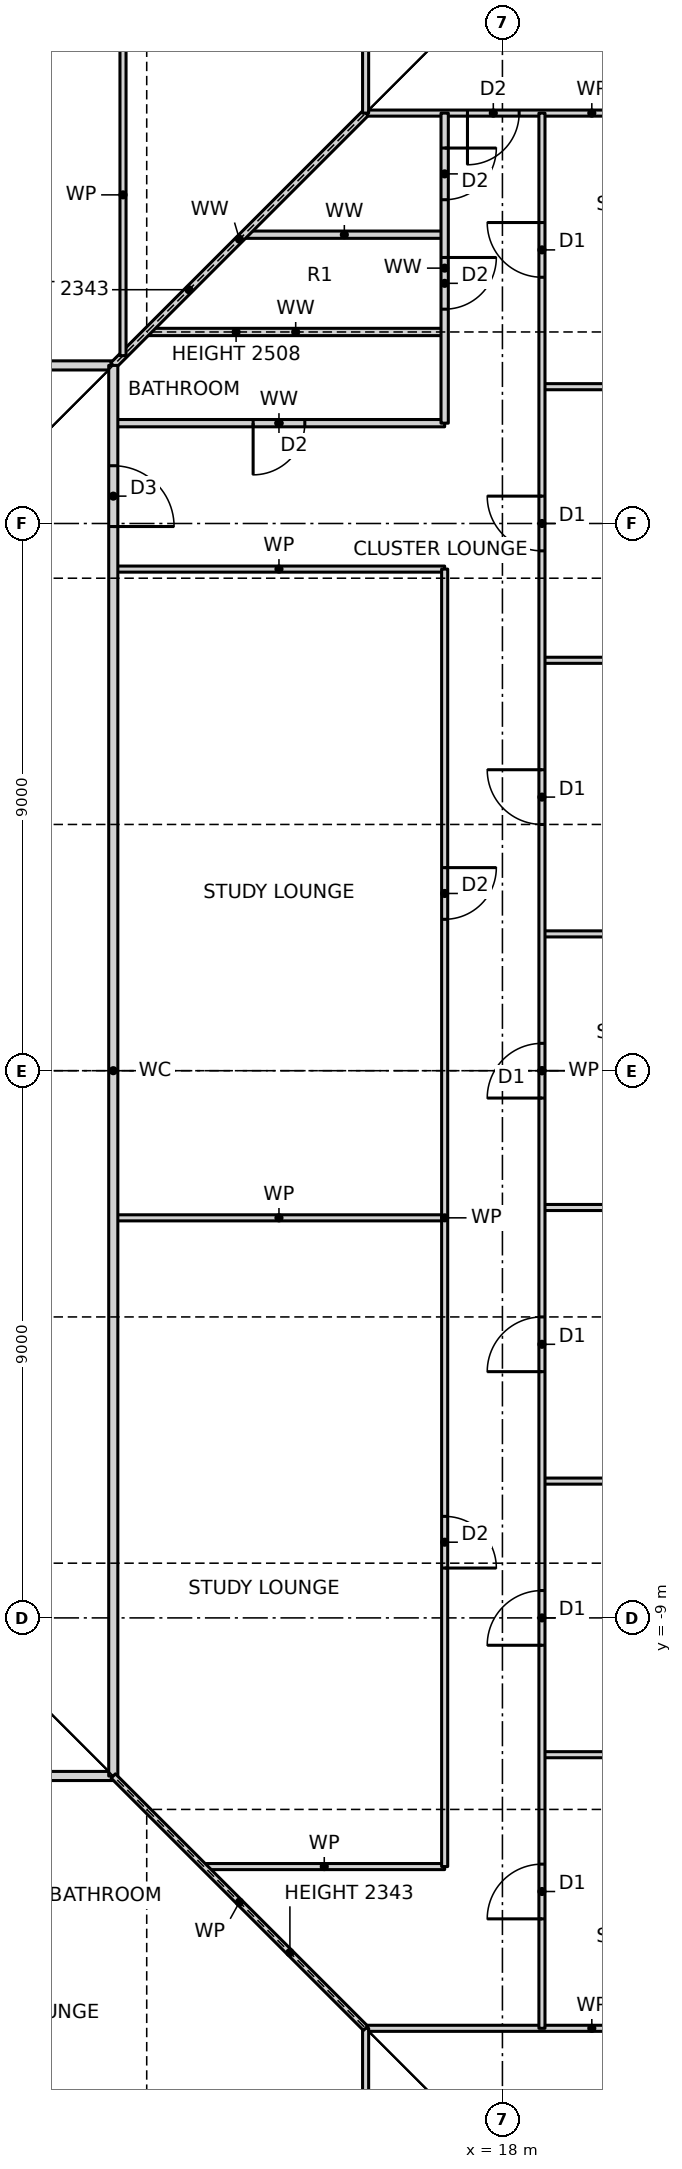
"""IFC4 building model, lengths in metres.
Left out: names, types, materials, properties, quantities, classifications, styles, units other than length and angle.
Written with IfcOpenShell. Run it as: python <this file> out.ifc"""

import sys

from ifc_helpers import new_model, si_unit, direction, frame, frame_2d, origin, place, context, subcontext, project, spatial, rectangle, extrude, element, fill, save


model = new_model("IFC4")
c1 = context("Model", 3, precision=1e-05, world=origin(), true_north=direction((0.0, 1.0)))
c2 = subcontext(c1, "Body", "Model", "MODEL_VIEW")
j1 = project(units=[si_unit("LENGTHUNIT", "METRE"), si_unit("PLANEANGLEUNIT", "RADIAN")], contexts=[c1])
p1 = place(None, origin())
s1 = spatial("IfcSite", under=j1, at=p1, CompositionType="ELEMENT")
p2 = place(p1, origin())
s2 = spatial("IfcBuilding", under=s1, at=p2, CompositionType="ELEMENT")
p3 = place(p2, frame((0.0, 0.0, 46.5)))
s3 = spatial("IfcBuildingStorey", under=s2, at=p3, CompositionType="ELEMENT", Elevation=46.5)
p4 = place(p3, frame((15.75, -15.75, 0.0), z_axis=(0.0, 0.0, 1.0), x_axis=(1.0, 0.0, 0.0)))
e1 = element("IfcWall", 1, at=p4, inside=s3, PredefinedType="PARTITIONING", context=c2, shape_type="SweptSolid", body=[
    extrude(rectangle(XDim=7.44, YDim=0.1, at=frame_2d((3.72, 0.0))), origin(), (0.0, 0.0, 1.0), 3.27),
])
p5 = place(p3, frame((13.09, -13.09, 0.0), z_axis=(0.0, 0.0, 1.0), x_axis=(1.0, 0.0, 0.0)))
e2 = element("IfcWall", 2, at=p5, inside=s3, PredefinedType="PARTITIONING", context=c2, shape_type="SweptSolid", body=[
    extrude(rectangle(XDim=3.96, YDim=0.1, at=frame_2d((1.98, 0.0))), origin(), (0.0, 0.0, 1.0), 3.27),
])
p6 = place(p3, frame((-12.6, -11.6, 0.0), z_axis=(0.0, 0.0, 1.0), x_axis=(1.0, 0.0, 0.0)))
e3 = element("IfcWall", 3, at=p6, inside=s3, PredefinedType="PARTITIONING", context=c2, shape_type="SweptSolid", body=[
    extrude(rectangle(XDim=24.2, YDim=0.15, at=frame_2d((12.1, 0.0))), origin(), (0.0, 0.0, 1.0), 3.27),
])
p7 = place(p6, frame((2.64, 0.0, 0.0)))
e4 = element("IfcOpeningElement", 4, at=p7, cuts=e3, PredefinedType="OPENING", context=c2, shape_type="SweptSolid", body=[
    extrude(rectangle(XDim=1.0, YDim=2.1, at=frame_2d((0.5, 1.05))), frame((0.0, 0.085, 0.0), z_axis=(0.0, -1.0, 0.0), x_axis=(1.0, 0.0, 0.0)), (0.0, 0.0, 1.0), 0.17),
])
p8 = place(p6, frame((13.5, 0.0, 0.0)))
e5 = element("IfcOpeningElement", 5, at=p8, cuts=e3, PredefinedType="OPENING", context=c2, shape_type="SweptSolid", body=[
    extrude(rectangle(XDim=0.9, YDim=2.1, at=frame_2d((0.45, 1.05))), frame((0.0, 0.085, 0.0), z_axis=(0.0, -1.0, 0.0), x_axis=(1.0, 0.0, 0.0)), (0.0, 0.0, 1.0), 0.17),
])
p9 = place(p6, frame((22.025, 0.0, 0.0)))
e6 = element("IfcOpeningElement", 6, at=p9, cuts=e3, PredefinedType="OPENING", context=c2, shape_type="SweptSolid", body=[
    extrude(rectangle(XDim=1.0, YDim=2.1, at=frame_2d((0.5, 1.05))), frame((0.0, 0.085, 0.0), z_axis=(0.0, -1.0, 0.0), x_axis=(1.0, 0.0, 0.0)), (0.0, 0.0, 1.0), 0.17),
])
for number, where, z_axis, x_axis in (
    (7, (18.65, -11.25, 0.0), (0.0, 0.0, 1.0), (1.0, 0.0, 0.0)),
    (8, (18.65, -6.75, 0.0), (0.0, 0.0, 1.0), (1.0, 0.0, 0.0)),
):
    element("IfcWall", number, at=place(p3, frame(where, z_axis=z_axis, x_axis=x_axis)), inside=s3, PredefinedType="PARTITIONING", context=c2, shape_type="SweptSolid", body=[
        extrude(rectangle(XDim=4.54, YDim=0.1, at=frame_2d((2.27, 0.0))), origin(), (0.0, 0.0, 1.0), 3.27),
    ])
p10 = place(p3, frame((11.6, -2.42, 0.0), z_axis=(0.0, 0.0, 1.0), x_axis=(1.0, 0.0, 0.0)))
e9 = element("IfcWall", 9, at=p10, inside=s3, PredefinedType="PARTITIONING", context=c2, shape_type="SweptSolid", body=[
    extrude(rectangle(XDim=5.45, YDim=0.1, at=frame_2d((2.725, 0.0))), origin(), (0.0, 0.0, 1.0), 3.27),
])
for number, where, z_axis, x_axis in (
    (10, (18.65, -2.25, 0.0), (0.0, 0.0, 1.0), (1.0, 0.0, 0.0)),
    (11, (18.65, 2.25, 0.0), (0.0, 0.0, 1.0), (1.0, 0.0, 0.0)),
    (12, (18.65, 6.75, 0.0), (0.0, 0.0, 1.0), (1.0, 0.0, 0.0)),
):
    element("IfcWall", number, at=place(p3, frame(where, z_axis=z_axis, x_axis=x_axis)), inside=s3, PredefinedType="PARTITIONING", context=c2, shape_type="SweptSolid", body=[
        extrude(rectangle(XDim=4.54, YDim=0.1, at=frame_2d((2.27, 0.0))), origin(), (0.0, 0.0, 1.0), 3.27),
    ])
p11 = place(p3, frame((11.6, 8.25, 0.0), z_axis=(0.0, 0.0, 1.0), x_axis=(1.0, 0.0, 0.0)))
e13 = element("IfcWall", 13, at=p11, inside=s3, PredefinedType="PARTITIONING", context=c2, shape_type="SweptSolid", body=[
    extrude(rectangle(XDim=5.45, YDim=0.1, at=frame_2d((2.725, 0.0))), origin(), (0.0, 0.0, 1.0), 3.27),
])
p12 = place(p3, frame((11.6, 10.65, 0.0), z_axis=(0.0, 0.0, 1.0), x_axis=(1.0, 0.0, 0.0)))
e14 = element("IfcWall", 14, at=p12, inside=s3, PredefinedType="PARTITIONING", context=c2, shape_type="SweptSolid", body=[
    extrude(rectangle(XDim=5.45, YDim=0.12, at=frame_2d((2.725, 0.0))), origin(), (0.0, 0.0, 1.0), 3.27),
])
p13 = place(p12, frame((2.3, 0.0, 0.0)))
e15 = element("IfcOpeningElement", 15, at=p13, cuts=e14, PredefinedType="OPENING", context=c2, shape_type="SweptSolid", body=[
    extrude(rectangle(XDim=0.85, YDim=2.1, at=frame_2d((0.425, 1.05))), frame((0.0, 0.07, 0.0), z_axis=(0.0, -1.0, 0.0), x_axis=(1.0, 0.0, 0.0)), (0.0, 0.0, 1.0), 0.14),
])
p14 = place(p3, frame((18.65, 11.25, 0.0), z_axis=(0.0, 0.0, 1.0), x_axis=(1.0, 0.0, 0.0)))
e16 = element("IfcWall", 16, at=p14, inside=s3, PredefinedType="PARTITIONING", context=c2, shape_type="SweptSolid", body=[
    extrude(rectangle(XDim=4.54, YDim=0.1, at=frame_2d((2.27, 0.0))), origin(), (0.0, 0.0, 1.0), 3.27),
])
p15 = place(p3, frame((-12.6, 11.6, 0.0), z_axis=(0.0, 0.0, 1.0), x_axis=(1.0, 0.0, 0.0)))
e17 = element("IfcWall", 17, at=p15, inside=s3, PredefinedType="PARTITIONING", context=c2, shape_type="SweptSolid", body=[
    extrude(rectangle(XDim=24.2, YDim=0.15, at=frame_2d((12.1, 0.0))), origin(), (0.0, 0.0, 1.0), 3.27),
])
p16 = place(p15, frame((7.15, 0.0, 0.0)))
e18 = element("IfcOpeningElement", 18, at=p16, cuts=e17, PredefinedType="OPENING", context=c2, shape_type="SweptSolid", body=[
    extrude(rectangle(XDim=1.0, YDim=2.1, at=frame_2d((0.5, 1.05))), frame((0.0, 0.085, 0.0), z_axis=(0.0, -1.0, 0.0), x_axis=(1.0, 0.0, 0.0)), (0.0, 0.0, 1.0), 0.17),
])
p17 = place(p3, frame((12.15, 12.15, 0.0), z_axis=(0.0, 0.0, 1.0), x_axis=(1.0, 0.0, 0.0)))
e19 = element("IfcWall", 19, at=p17, inside=s3, PredefinedType="PARTITIONING", context=c2, shape_type="SweptSolid", body=[
    extrude(rectangle(XDim=4.9, YDim=0.12, at=frame_2d((2.45, 0.0))), origin(), (0.0, 0.0, 1.0), 2.508),
])
p18 = place(p3, frame((13.75, 13.75, 0.0), z_axis=(0.0, 0.0, 1.0), x_axis=(1.0, 0.0, 0.0)))
e20 = element("IfcWall", 20, at=p18, inside=s3, PredefinedType="PARTITIONING", context=c2, shape_type="SweptSolid", body=[
    extrude(rectangle(XDim=3.3, YDim=0.12, at=frame_2d((1.65, 0.0))), origin(), (0.0, 0.0, 1.0), 3.27),
])
p19 = place(p3, frame((15.75, 15.75, 0.0), z_axis=(0.0, 0.0, 1.0), x_axis=(1.0, 0.0, 0.0)))
e21 = element("IfcWall", 21, at=p19, inside=s3, PredefinedType="PARTITIONING", context=c2, shape_type="SweptSolid", body=[
    extrude(rectangle(XDim=7.44, YDim=0.1, at=frame_2d((3.72, 0.0))), origin(), (0.0, 0.0, 1.0), 3.27),
])
p20 = place(p19, frame((1.675, 0.0, 0.0)))
e22 = element("IfcOpeningElement", 22, at=p20, cuts=e21, PredefinedType="OPENING", context=c2, shape_type="SweptSolid", body=[
    extrude(rectangle(XDim=0.85, YDim=2.1, at=frame_2d((0.425, 1.05))), frame((0.0, 0.06, 0.0), z_axis=(0.0, -1.0, 0.0), x_axis=(1.0, 0.0, 0.0)), (0.0, 0.0, 1.0), 0.12),
])
p21 = place(p3, frame((11.6, 11.6, 0.0), z_axis=(0.0, 0.0, 1.0), x_axis=(0.707106781187, 0.707106781187, 0.0)))
e23 = element("IfcWall", 23, at=p21, inside=s3, PredefinedType="PARTITIONING", context=c2, shape_type="SweptSolid", body=[
    extrude(rectangle(XDim=5.869, YDim=0.12, at=frame_2d((2.935, 0.0))), origin(), (0.0, 0.0, 1.0), 2.343),
])
p22 = place(p3, frame((18.65, -15.75, 0.0), z_axis=(0.0, 0.0, 1.0), x_axis=(0.0, 1.0, 0.0)))
e24 = element("IfcWall", 24, at=p22, inside=s3, PredefinedType="PARTITIONING", context=c2, shape_type="SweptSolid", body=[
    extrude(rectangle(XDim=31.5, YDim=0.1, at=frame_2d((15.75, 0.0))), origin(), (0.0, 0.0, 1.0), 3.27),
])
p23 = place(p22, frame((1.8, 0.0, 0.0)))
e25 = element("IfcOpeningElement", 25, at=p23, cuts=e24, PredefinedType="OPENING", context=c2, shape_type="SweptSolid", body=[
    extrude(rectangle(XDim=0.9, YDim=2.1, at=frame_2d((0.45, 1.05))), frame((0.0, 0.06, 0.0), z_axis=(0.0, -1.0, 0.0), x_axis=(1.0, 0.0, 0.0)), (0.0, 0.0, 1.0), 0.12),
])
p24 = place(p22, frame((6.3, 0.0, 0.0)))
e26 = element("IfcOpeningElement", 26, at=p24, cuts=e24, PredefinedType="OPENING", context=c2, shape_type="SweptSolid", body=[
    extrude(rectangle(XDim=0.9, YDim=2.1, at=frame_2d((0.45, 1.05))), frame((0.0, 0.06, 0.0), z_axis=(0.0, -1.0, 0.0), x_axis=(1.0, 0.0, 0.0)), (0.0, 0.0, 1.0), 0.12),
])
p25 = place(p22, frame((10.8, 0.0, 0.0)))
e27 = element("IfcOpeningElement", 27, at=p25, cuts=e24, PredefinedType="OPENING", context=c2, shape_type="SweptSolid", body=[
    extrude(rectangle(XDim=0.9, YDim=2.1, at=frame_2d((0.45, 1.05))), frame((0.0, 0.06, 0.0), z_axis=(0.0, -1.0, 0.0), x_axis=(1.0, 0.0, 0.0)), (0.0, 0.0, 1.0), 0.12),
])
p26 = place(p22, frame((15.3, 0.0, 0.0)))
e28 = element("IfcOpeningElement", 28, at=p26, cuts=e24, PredefinedType="OPENING", context=c2, shape_type="SweptSolid", body=[
    extrude(rectangle(XDim=0.9, YDim=2.1, at=frame_2d((0.45, 1.05))), frame((0.0, 0.06, 0.0), z_axis=(0.0, -1.0, 0.0), x_axis=(1.0, 0.0, 0.0)), (0.0, 0.0, 1.0), 0.12),
])
p27 = place(p22, frame((19.8, 0.0, 0.0)))
e29 = element("IfcOpeningElement", 29, at=p27, cuts=e24, PredefinedType="OPENING", context=c2, shape_type="SweptSolid", body=[
    extrude(rectangle(XDim=0.9, YDim=2.1, at=frame_2d((0.45, 1.05))), frame((0.0, 0.06, 0.0), z_axis=(0.0, -1.0, 0.0), x_axis=(1.0, 0.0, 0.0)), (0.0, 0.0, 1.0), 0.12),
])
p28 = place(p22, frame((24.3, 0.0, 0.0)))
e30 = element("IfcOpeningElement", 30, at=p28, cuts=e24, PredefinedType="OPENING", context=c2, shape_type="SweptSolid", body=[
    extrude(rectangle(XDim=0.9, YDim=2.1, at=frame_2d((0.45, 1.05))), frame((0.0, 0.06, 0.0), z_axis=(0.0, -1.0, 0.0), x_axis=(1.0, 0.0, 0.0)), (0.0, 0.0, 1.0), 0.12),
])
p29 = place(p22, frame((28.8, 0.0, 0.0)))
e31 = element("IfcOpeningElement", 31, at=p29, cuts=e24, PredefinedType="OPENING", context=c2, shape_type="SweptSolid", body=[
    extrude(rectangle(XDim=0.9, YDim=2.1, at=frame_2d((0.45, 1.05))), frame((0.0, 0.06, 0.0), z_axis=(0.0, -1.0, 0.0), x_axis=(1.0, 0.0, 0.0)), (0.0, 0.0, 1.0), 0.12),
])
p30 = place(p3, frame((17.05, -13.09, 0.0), z_axis=(0.0, 0.0, 1.0), x_axis=(0.0, 1.0, 0.0)))
e32 = element("IfcWall", 32, at=p30, inside=s3, PredefinedType="PARTITIONING", context=c2, shape_type="SweptSolid", body=[
    extrude(rectangle(XDim=21.34, YDim=0.1, at=frame_2d((10.67, 0.0))), origin(), (0.0, 0.0, 1.0), 3.27),
])
p31 = place(p30, frame((4.91, 0.0, 0.0)))
e33 = element("IfcOpeningElement", 33, at=p31, cuts=e32, PredefinedType="OPENING", context=c2, shape_type="SweptSolid", body=[
    extrude(rectangle(XDim=0.85, YDim=2.1, at=frame_2d((0.425, 1.05))), frame((0.0, 0.06, 0.0), z_axis=(0.0, -1.0, 0.0), x_axis=(1.0, 0.0, 0.0)), (0.0, 0.0, 1.0), 0.12),
])
p32 = place(p30, frame((15.58, 0.0, 0.0)))
e34 = element("IfcOpeningElement", 34, at=p32, cuts=e32, PredefinedType="OPENING", context=c2, shape_type="SweptSolid", body=[
    extrude(rectangle(XDim=0.85, YDim=2.1, at=frame_2d((0.425, 1.05))), frame((0.0, 0.06, 0.0), z_axis=(0.0, -1.0, 0.0), x_axis=(1.0, 0.0, 0.0)), (0.0, 0.0, 1.0), 0.12),
])
p33 = place(p3, frame((17.05, 10.65, 0.0), z_axis=(0.0, 0.0, 1.0), x_axis=(0.0, 1.0, 0.0)))
e35 = element("IfcWall", 35, at=p33, inside=s3, PredefinedType="PARTITIONING", context=c2, shape_type="SweptSolid", body=[
    extrude(rectangle(XDim=5.1, YDim=0.12, at=frame_2d((2.55, 0.0))), origin(), (0.0, 0.0, 1.0), 3.27),
])
p34 = place(p33, frame((1.875, 0.0, 0.0)))
e36 = element("IfcOpeningElement", 36, at=p34, cuts=e35, PredefinedType="OPENING", context=c2, shape_type="SweptSolid", body=[
    extrude(rectangle(XDim=0.85, YDim=2.1, at=frame_2d((0.425, 1.05))), frame((0.0, 0.07, 0.0), z_axis=(0.0, -1.0, 0.0), x_axis=(1.0, 0.0, 0.0)), (0.0, 0.0, 1.0), 0.14),
])
p35 = place(p33, frame((3.675, 0.0, 0.0)))
e37 = element("IfcOpeningElement", 37, at=p35, cuts=e35, PredefinedType="OPENING", context=c2, shape_type="SweptSolid", body=[
    extrude(rectangle(XDim=0.85, YDim=2.1, at=frame_2d((0.425, 1.05))), frame((0.0, 0.07, 0.0), z_axis=(0.0, -1.0, 0.0), x_axis=(1.0, 0.0, 0.0)), (0.0, 0.0, 1.0), 0.14),
])
p36 = place(p3, frame((15.75, -23.19, 0.0), z_axis=(0.0, 0.0, 1.0), x_axis=(0.0, 1.0, 0.0)))
e38 = element("IfcWall", 38, at=p36, inside=s3, PredefinedType="PARTITIONING", context=c2, shape_type="SweptSolid", body=[
    extrude(rectangle(XDim=7.44, YDim=0.1, at=frame_2d((3.72, 0.0))), origin(), (0.0, 0.0, 1.0), 3.27),
])
p37 = place(p36, frame((4.915, 0.0, 0.0)))
e39 = element("IfcOpeningElement", 39, at=p37, cuts=e38, PredefinedType="OPENING", context=c2, shape_type="SweptSolid", body=[
    extrude(rectangle(XDim=0.85, YDim=2.1, at=frame_2d((0.425, 1.05))), frame((0.0, 0.06, 0.0), z_axis=(0.0, -1.0, 0.0), x_axis=(1.0, 0.0, 0.0)), (0.0, 0.0, 1.0), 0.12),
])
p38 = place(p3, frame((15.75, 15.75, 0.0), z_axis=(0.0, 0.0, 1.0), x_axis=(0.0, 1.0, 0.0)))
e40 = element("IfcWall", 40, at=p38, inside=s3, PredefinedType="PARTITIONING", context=c2, shape_type="SweptSolid", body=[
    extrude(rectangle(XDim=7.44, YDim=0.1, at=frame_2d((3.72, 0.0))), origin(), (0.0, 0.0, 1.0), 3.27),
])
p39 = place(p3, frame((11.76, 11.76, 0.0), z_axis=(0.0, 0.0, 1.0), x_axis=(0.0, 1.0, 0.0)))
e41 = element("IfcWall", 41, at=p39, inside=s3, PredefinedType="PARTITIONING", context=c2, shape_type="SweptSolid", body=[
    extrude(rectangle(XDim=5.29, YDim=0.1, at=frame_2d((2.645, 0.0))), origin(), (0.0, 0.0, 1.0), 3.27),
])
p40 = place(p3, frame((11.6, -11.6, 0.0), z_axis=(0.0, 0.0, 1.0), x_axis=(0.0, 1.0, 0.0)))
e42 = element("IfcWall", 42, at=p40, inside=s3, PredefinedType="PARTITIONING", context=c2, shape_type="SweptSolid", body=[
    extrude(rectangle(XDim=23.2, YDim=0.15, at=frame_2d((11.6, 0.0))), origin(), (0.0, 0.0, 1.0), 3.27),
])
p41 = place(p40, frame((20.55, 0.0, 0.0)))
e43 = element("IfcOpeningElement", 43, at=p41, cuts=e42, PredefinedType="OPENING", context=c2, shape_type="SweptSolid", body=[
    extrude(rectangle(XDim=1.0, YDim=2.1, at=frame_2d((0.5, 1.05))), frame((0.0, 0.085, 0.0), z_axis=(0.0, -1.0, 0.0), x_axis=(1.0, 0.0, 0.0)), (0.0, 0.0, 1.0), 0.17),
])
p42 = place(p3, frame((15.75, -15.75, 0.0), z_axis=(0.0, 0.0, 1.0), x_axis=(-0.707106781187, 0.707106781187, 0.0)))
e44 = element("IfcWall", 44, at=p42, inside=s3, PredefinedType="PARTITIONING", context=c2, shape_type="SweptSolid", body=[
    extrude(rectangle(XDim=5.869, YDim=0.1, at=frame_2d((2.935, 0.0))), origin(), (0.0, 0.0, 1.0), 2.343),
])
p43 = place(p23, origin())
e45 = element("IfcDoor", 45, at=p43, inside=s3, OperationType="SINGLE_SWING_LEFT", PredefinedType="DOOR", context=c2, shape_type="SweptSolid", body=[
    extrude(rectangle(XDim=0.9, YDim=2.1, at=frame_2d((0.45, 1.05))), frame((0.0, 0.025, 0.0), z_axis=(0.0, -1.0, 0.0), x_axis=(1.0, 0.0, 0.0)), (0.0, 0.0, 1.0), 0.05),
])
fill(e25, e45)
p44 = place(p24, origin())
e46 = element("IfcDoor", 46, at=p44, inside=s3, OperationType="SINGLE_SWING_LEFT", PredefinedType="DOOR", context=c2, shape_type="SweptSolid", body=[
    extrude(rectangle(XDim=0.9, YDim=2.1, at=frame_2d((0.45, 1.05))), frame((0.0, 0.025, 0.0), z_axis=(0.0, -1.0, 0.0), x_axis=(1.0, 0.0, 0.0)), (0.0, 0.0, 1.0), 0.05),
])
fill(e26, e46)
p45 = place(p25, origin())
e47 = element("IfcDoor", 47, at=p45, inside=s3, OperationType="SINGLE_SWING_LEFT", PredefinedType="DOOR", context=c2, shape_type="SweptSolid", body=[
    extrude(rectangle(XDim=0.9, YDim=2.1, at=frame_2d((0.45, 1.05))), frame((0.0, 0.025, 0.0), z_axis=(0.0, -1.0, 0.0), x_axis=(1.0, 0.0, 0.0)), (0.0, 0.0, 1.0), 0.05),
])
fill(e27, e47)
p46 = place(p26, origin())
e48 = element("IfcDoor", 48, at=p46, inside=s3, OperationType="SINGLE_SWING_LEFT", PredefinedType="DOOR", context=c2, shape_type="SweptSolid", body=[
    extrude(rectangle(XDim=0.9, YDim=2.1, at=frame_2d((0.45, 1.05))), frame((0.0, 0.025, 0.0), z_axis=(0.0, -1.0, 0.0), x_axis=(1.0, 0.0, 0.0)), (0.0, 0.0, 1.0), 0.05),
])
fill(e28, e48)
p47 = place(p27, origin())
e49 = element("IfcDoor", 49, at=p47, inside=s3, OperationType="SINGLE_SWING_RIGHT", PredefinedType="DOOR", context=c2, shape_type="SweptSolid", body=[
    extrude(rectangle(XDim=0.9, YDim=2.1, at=frame_2d((0.45, 1.05))), frame((0.0, 0.025, 0.0), z_axis=(0.0, -1.0, 0.0), x_axis=(1.0, 0.0, 0.0)), (0.0, 0.0, 1.0), 0.05),
])
fill(e29, e49)
p48 = place(p28, origin())
e50 = element("IfcDoor", 50, at=p48, inside=s3, OperationType="SINGLE_SWING_RIGHT", PredefinedType="DOOR", context=c2, shape_type="SweptSolid", body=[
    extrude(rectangle(XDim=0.9, YDim=2.1, at=frame_2d((0.45, 1.05))), frame((0.0, 0.025, 0.0), z_axis=(0.0, -1.0, 0.0), x_axis=(1.0, 0.0, 0.0)), (0.0, 0.0, 1.0), 0.05),
])
fill(e30, e50)
p49 = place(p29, origin())
e51 = element("IfcDoor", 51, at=p49, inside=s3, OperationType="SINGLE_SWING_RIGHT", PredefinedType="DOOR", context=c2, shape_type="SweptSolid", body=[
    extrude(rectangle(XDim=0.9, YDim=2.1, at=frame_2d((0.45, 1.05))), frame((0.0, 0.025, 0.0), z_axis=(0.0, -1.0, 0.0), x_axis=(1.0, 0.0, 0.0)), (0.0, 0.0, 1.0), 0.05),
])
fill(e31, e51)
p50 = place(p41, frame((1.0, 0.0, 0.0), z_axis=(0.0, 0.0, 1.0), x_axis=(-1.0, 0.0, 0.0)))
e52 = element("IfcDoor", 52, at=p50, inside=s3, OperationType="SINGLE_SWING_RIGHT", PredefinedType="DOOR", context=c2, shape_type="SweptSolid", body=[
    extrude(rectangle(XDim=1.0, YDim=2.1, at=frame_2d((0.5, 1.05))), frame((0.0, 0.025, 0.0), z_axis=(0.0, -1.0, 0.0), x_axis=(1.0, 0.0, 0.0)), (0.0, 0.0, 1.0), 0.05),
])
fill(e43, e52)
p51 = place(p31, frame((0.85, 0.0, 0.0), z_axis=(0.0, 0.0, 1.0), x_axis=(-1.0, 0.0, 0.0)))
e53 = element("IfcDoor", 53, at=p51, inside=s3, OperationType="SINGLE_SWING_RIGHT", PredefinedType="DOOR", context=c2, shape_type="SweptSolid", body=[
    extrude(rectangle(XDim=0.85, YDim=2.1, at=frame_2d((0.425, 1.05))), frame((0.0, 0.025, 0.0), z_axis=(0.0, -1.0, 0.0), x_axis=(1.0, 0.0, 0.0)), (0.0, 0.0, 1.0), 0.05),
])
fill(e33, e53)
p52 = place(p32, frame((0.85, 0.0, 0.0), z_axis=(0.0, 0.0, 1.0), x_axis=(-1.0, 0.0, 0.0)))
e54 = element("IfcDoor", 54, at=p52, inside=s3, OperationType="SINGLE_SWING_LEFT", PredefinedType="DOOR", context=c2, shape_type="SweptSolid", body=[
    extrude(rectangle(XDim=0.85, YDim=2.1, at=frame_2d((0.425, 1.05))), frame((0.0, 0.025, 0.0), z_axis=(0.0, -1.0, 0.0), x_axis=(1.0, 0.0, 0.0)), (0.0, 0.0, 1.0), 0.05),
])
fill(e34, e54)
p53 = place(p13, frame((0.85, 0.0, 0.0), z_axis=(0.0, 0.0, 1.0), x_axis=(-1.0, 0.0, 0.0)))
e55 = element("IfcDoor", 55, at=p53, inside=s3, OperationType="SINGLE_SWING_RIGHT", PredefinedType="DOOR", context=c2, shape_type="SweptSolid", body=[
    extrude(rectangle(XDim=0.85, YDim=2.1, at=frame_2d((0.425, 1.05))), frame((0.0, 0.025, 0.0), z_axis=(0.0, -1.0, 0.0), x_axis=(1.0, 0.0, 0.0)), (0.0, 0.0, 1.0), 0.05),
])
fill(e15, e55)
p54 = place(p34, frame((0.85, 0.0, 0.0), z_axis=(0.0, 0.0, 1.0), x_axis=(-1.0, 0.0, 0.0)))
e56 = element("IfcDoor", 56, at=p54, inside=s3, OperationType="SINGLE_SWING_LEFT", PredefinedType="DOOR", context=c2, shape_type="SweptSolid", body=[
    extrude(rectangle(XDim=0.85, YDim=2.1, at=frame_2d((0.425, 1.05))), frame((0.0, 0.025, 0.0), z_axis=(0.0, -1.0, 0.0), x_axis=(1.0, 0.0, 0.0)), (0.0, 0.0, 1.0), 0.05),
])
fill(e36, e56)
p55 = place(p35, frame((0.85, 0.0, 0.0), z_axis=(0.0, 0.0, 1.0), x_axis=(-1.0, 0.0, 0.0)))
e57 = element("IfcDoor", 57, at=p55, inside=s3, OperationType="SINGLE_SWING_LEFT", PredefinedType="DOOR", context=c2, shape_type="SweptSolid", body=[
    extrude(rectangle(XDim=0.85, YDim=2.1, at=frame_2d((0.425, 1.05))), frame((0.0, 0.025, 0.0), z_axis=(0.0, -1.0, 0.0), x_axis=(1.0, 0.0, 0.0)), (0.0, 0.0, 1.0), 0.05),
])
fill(e37, e57)
p56 = place(p20, frame((0.85, 0.0, 0.0), z_axis=(0.0, 0.0, 1.0), x_axis=(-1.0, 0.0, 0.0)))
e58 = element("IfcDoor", 58, at=p56, inside=s3, OperationType="SINGLE_SWING_RIGHT", PredefinedType="DOOR", context=c2, shape_type="SweptSolid", body=[
    extrude(rectangle(XDim=0.85, YDim=2.1, at=frame_2d((0.425, 1.05))), frame((0.0, 0.025, 0.0), z_axis=(0.0, -1.0, 0.0), x_axis=(1.0, 0.0, 0.0)), (0.0, 0.0, 1.0), 0.05),
])
fill(e22, e58)
save(model, sys.argv[1])
